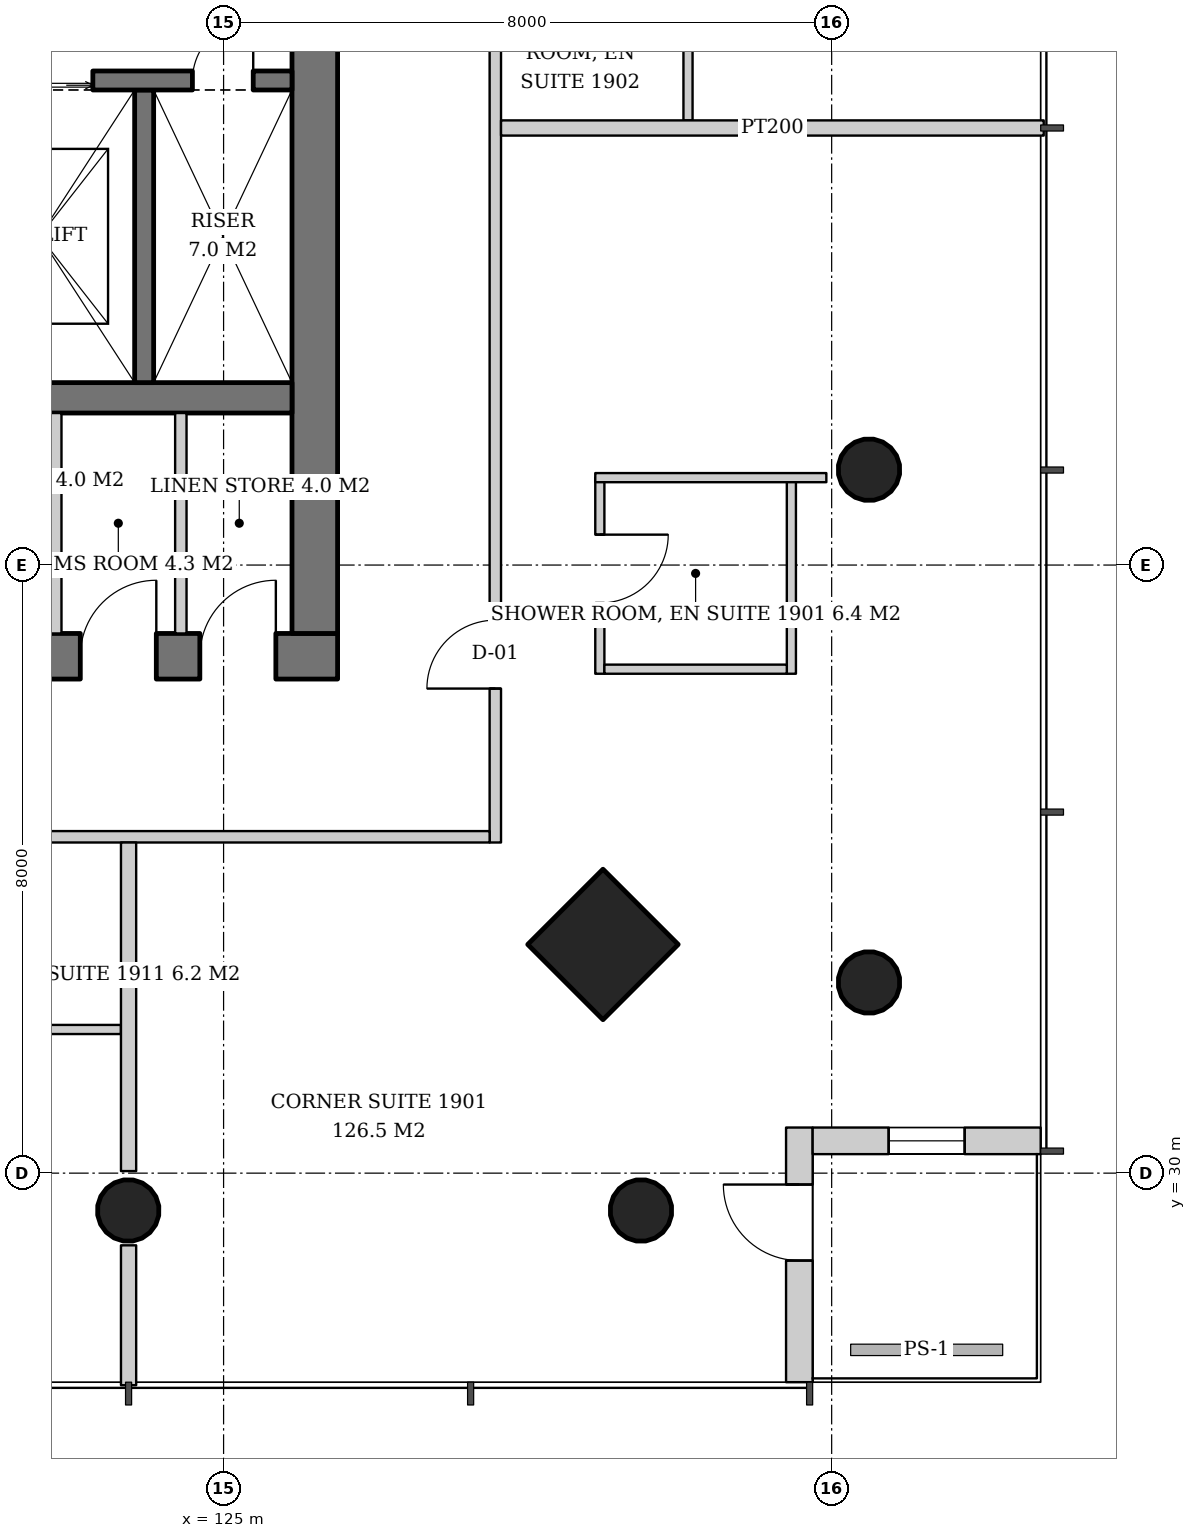
"""IFC4 building model, lengths in metres.
Left out: names, types, materials, properties, quantities, classifications, styles, units other than length and angle.
Written with IfcOpenShell. Run it as: python <this file> out.ifc"""

import sys

from ifc_helpers import new_model, si_unit, direction, frame, frame_2d, origin, origin_2d, place, context, subcontext, project, spatial, rectangle, hollow_circle, extrude, element, fill, save


model = new_model("IFC4")
c1 = context("Model", 3, precision=1e-05, world=origin(), true_north=direction((0.0, 1.0)))
c2 = subcontext(c1, "Body", "Model", "MODEL_VIEW")
j1 = project(units=[si_unit("LENGTHUNIT", "METRE"), si_unit("PLANEANGLEUNIT", "RADIAN")], contexts=[c1])
p1 = place(None, origin())
s1 = spatial("IfcSite", under=j1, at=p1, CompositionType="ELEMENT")
p2 = place(p1, origin())
s2 = spatial("IfcBuilding", under=s1, at=p2, CompositionType="ELEMENT")
p3 = place(p2, frame((0.0, 0.0, 78.0)))
s3 = spatial("IfcBuildingStorey", under=s2, at=p3, CompositionType="ELEMENT", Elevation=78.0)
p4 = place(p3, frame((133.543, 32.457, 0.0), z_axis=(-0.043029647111, 0.043029647111, 0.998146732169), x_axis=(-0.707106781187, -0.707106781187, 0.0)))
e1 = element("IfcColumn", 1, at=p4, inside=s3, PredefinedType="COLUMN", context=c2, shape_type="SweptSolid", body=[
    extrude(hollow_circle(Radius=0.406, WallThickness=0.03, at=origin_2d()), origin(), (0.0, 0.0, 1.0), 3.807),
])
p5 = place(p3, frame((133.543, 39.229, 0.0), z_axis=(-0.043059584825, 0.021497706284, 0.998841188968), x_axis=(-0.446680166538, -0.894693706707, 0.0)))
e2 = element("IfcColumn", 2, at=p5, inside=s3, PredefinedType="COLUMN", context=c2, shape_type="SweptSolid", body=[
    extrude(hollow_circle(Radius=0.406, WallThickness=0.03, at=origin_2d()), origin(), (0.0, 0.0, 1.0), 3.804),
])
p6 = place(p3, frame((130.043, 32.957, 0.0), z_axis=(-0.043029647111, 0.043029647111, 0.998146732169), x_axis=(-0.707106781187, -0.707106781187, 0.0)))
e3 = element("IfcColumn", 3, at=p6, inside=s3, PredefinedType="COLUMN", context=c2, shape_type="SweptSolid", body=[
    extrude(rectangle(XDim=1.4, YDim=1.4, at=origin_2d()), origin(), (0.0, 0.0, 1.0), 3.807),
])
p7 = place(p3, frame((130.543, 29.457, 0.0), z_axis=(-0.043029647111, 0.043029647111, 0.998146732169), x_axis=(-0.707106781187, -0.707106781187, 0.0)))
e4 = element("IfcColumn", 4, at=p7, inside=s3, PredefinedType="COLUMN", context=c2, shape_type="SweptSolid", body=[
    extrude(hollow_circle(Radius=0.406, WallThickness=0.03, at=origin_2d()), origin(), (0.0, 0.0, 1.0), 3.807),
])
p8 = place(p3, frame((123.771, 29.457, 0.0), z_axis=(-0.021497706284, 0.043059584825, 0.998841188968), x_axis=(-0.894693706707, -0.446680166538, 0.0)))
e5 = element("IfcColumn", 5, at=p8, inside=s3, PredefinedType="COLUMN", context=c2, shape_type="SweptSolid", body=[
    extrude(hollow_circle(Radius=0.406, WallThickness=0.03, at=origin_2d()), origin(), (0.0, 0.0, 1.0), 3.804),
])
p9 = place(p3, frame((107.5, 36.8, 0.0), z_axis=(0.0, 0.0, 1.0), x_axis=(1.0, 0.0, 0.0)))
e6 = element("IfcWall", 6, at=p9, inside=s3, PredefinedType="SHEAR", context=c2, shape_type="SweptSolid", body=[
    extrude(rectangle(XDim=19.0, YDim=0.6, at=frame_2d((9.5, 0.0))), origin(), (0.0, 0.0, 1.0), 3.8),
])
p10 = place(p9, frame((3.9, 0.0, 0.0)))
e7 = element("IfcOpeningElement", 7, at=p10, cuts=e6, PredefinedType="OPENING", context=c2, shape_type="SweptSolid", body=[
    extrude(rectangle(XDim=1.0, YDim=2.1, at=frame_2d((0.5, 1.05))), frame((0.0, 0.31, 0.0), z_axis=(0.0, -1.0, 0.0), x_axis=(1.0, 0.0, 0.0)), (0.0, 0.0, 1.0), 0.62),
])
p11 = place(p9, frame((14.08, 0.0, 0.0)))
e8 = element("IfcOpeningElement", 8, at=p11, cuts=e6, PredefinedType="OPENING", context=c2, shape_type="SweptSolid", body=[
    extrude(rectangle(XDim=1.0, YDim=2.1, at=frame_2d((0.5, 1.05))), frame((0.0, 0.31, 0.0), z_axis=(0.0, -1.0, 0.0), x_axis=(1.0, 0.0, 0.0)), (0.0, 0.0, 1.0), 0.62),
])
p12 = place(p9, frame((15.615, 0.0, 0.0)))
e9 = element("IfcOpeningElement", 9, at=p12, cuts=e6, PredefinedType="OPENING", context=c2, shape_type="SweptSolid", body=[
    extrude(rectangle(XDim=1.0, YDim=2.1, at=frame_2d((0.5, 1.05))), frame((0.0, 0.31, 0.0), z_axis=(0.0, -1.0, 0.0), x_axis=(1.0, 0.0, 0.0)), (0.0, 0.0, 1.0), 0.62),
])
p13 = place(p9, frame((17.188, 0.0, 0.0)))
e10 = element("IfcOpeningElement", 10, at=p13, cuts=e6, PredefinedType="OPENING", context=c2, shape_type="SweptSolid", body=[
    extrude(rectangle(XDim=1.0, YDim=2.1, at=frame_2d((0.5, 1.05))), frame((0.0, 0.31, 0.0), z_axis=(0.0, -1.0, 0.0), x_axis=(1.0, 0.0, 0.0)), (0.0, 0.0, 1.0), 0.62),
])
p14 = place(p3, frame((126.2, 37.1, 0.0), z_axis=(0.0, 0.0, 1.0), x_axis=(0.0, 1.0, 0.0)))
e11 = element("IfcWall", 11, at=p14, inside=s3, PredefinedType="SHEAR", context=c2, shape_type="SweptSolid", body=[
    extrude(rectangle(XDim=17.8, YDim=0.6, at=frame_2d((8.9, 0.0))), origin(), (0.0, 0.0, 1.0), 3.8),
])
p15 = place(p14, frame((8.0, 0.0, 0.0)))
e12 = element("IfcOpeningElement", 12, at=p15, cuts=e11, PredefinedType="OPENING", context=c2, shape_type="SweptSolid", body=[
    extrude(rectangle(XDim=1.8, YDim=2.4, at=frame_2d((0.9, 1.2))), frame((0.0, 0.31, 0.0), z_axis=(0.0, -1.0, 0.0), x_axis=(1.0, 0.0, 0.0)), (0.0, 0.0, 1.0), 0.62),
])
p16 = place(p3, frame((108.1, 40.2, 0.0), z_axis=(0.0, 0.0, 1.0), x_axis=(1.0, 0.0, 0.0)))
e13 = element("IfcWall", 13, at=p16, inside=s3, PredefinedType="SHEAR", context=c2, shape_type="SweptSolid", body=[
    extrude(rectangle(XDim=17.8, YDim=0.4, at=frame_2d((8.9, 0.0))), origin(), (0.0, 0.0, 1.0), 3.8),
])
p17 = place(p3, frame((132.575, 27.25, 0.0), z_axis=(0.0, 0.0, 1.0), x_axis=(0.0, 1.0, 0.0)))
e14 = element("IfcWall", 14, at=p17, inside=s3, PredefinedType="SOLIDWALL", context=c2, shape_type="SweptSolid", body=[
    extrude(rectangle(XDim=3.35, YDim=0.35, at=frame_2d((1.675, 0.0))), origin(), (0.0, 0.0, 1.0), 3.52),
])
p18 = place(p17, frame((1.6, 0.0, 0.0)))
e15 = element("IfcOpeningElement", 15, at=p18, cuts=e14, PredefinedType="OPENING", context=c2, shape_type="SweptSolid", body=[
    extrude(rectangle(XDim=1.0, YDim=2.4, at=frame_2d((0.5, 1.2))), frame((0.0, 0.185, 0.0), z_axis=(0.0, -1.0, 0.0), x_axis=(1.0, 0.0, 0.0)), (0.0, 0.0, 1.0), 0.37),
])
p19 = place(p3, frame((132.75, 30.425, 0.0), z_axis=(0.0, 0.0, 1.0), x_axis=(1.0, 0.0, 0.0)))
e16 = element("IfcWall", 16, at=p19, inside=s3, PredefinedType="SOLIDWALL", context=c2, shape_type="SweptSolid", body=[
    extrude(rectangle(XDim=3.0, YDim=0.35, at=frame_2d((1.5, 0.0))), origin(), (0.0, 0.0, 1.0), 3.52),
])
p20 = place(p19, frame((1.0, 0.0, 0.82)))
e17 = element("IfcOpeningElement", 17, at=p20, cuts=e16, PredefinedType="OPENING", context=c2, shape_type="SweptSolid", body=[
    extrude(rectangle(XDim=1.0, YDim=2.4, at=frame_2d((0.5, 1.2))), frame((0.0, 0.185, 0.0), z_axis=(0.0, -1.0, 0.0), x_axis=(1.0, 0.0, 0.0)), (0.0, 0.0, 1.0), 0.37),
])
p21 = place(p3, frame((123.955, 44.25, 0.0), z_axis=(0.0, 0.0, 1.0), x_axis=(0.0, -1.0, 0.0)))
e18 = element("IfcWall", 18, at=p21, inside=s3, PredefinedType="SHEAR", context=c2, shape_type="SweptSolid", body=[
    extrude(rectangle(XDim=3.85, YDim=0.25, at=frame_2d((1.925, 0.0))), origin(), (0.0, 0.0, 1.0), 3.8),
])
p22 = place(p3, frame((121.33, 44.375, 0.0), z_axis=(0.0, 0.0, 1.0), x_axis=(1.0, 0.0, 0.0)))
e19 = element("IfcWall", 19, at=p22, inside=s3, PredefinedType="SHEAR", context=c2, shape_type="SweptSolid", body=[
    extrude(rectangle(XDim=4.57, YDim=0.25, at=frame_2d((2.285, 0.0))), origin(), (0.0, 0.0, 1.0), 3.8),
])
p23 = place(p22, frame((0.55, 0.0, 0.0)))
e20 = element("IfcOpeningElement", 20, at=p23, cuts=e19, PredefinedType="OPENING", context=c2, shape_type="SweptSolid", body=[
    extrude(rectangle(XDim=1.4, YDim=2.4, at=frame_2d((0.7, 1.2))), frame((0.0, 0.135, 0.0), z_axis=(0.0, -1.0, 0.0), x_axis=(1.0, 0.0, 0.0)), (0.0, 0.0, 1.0), 0.27),
])
p24 = place(p22, frame((3.26, 0.0, 0.0)))
e21 = element("IfcOpeningElement", 21, at=p24, cuts=e19, PredefinedType="OPENING", context=c2, shape_type="SweptSolid", body=[
    extrude(rectangle(XDim=0.8, YDim=2.0, at=frame_2d((0.4, 1.0))), frame((0.0, 0.135, 0.0), z_axis=(0.0, -1.0, 0.0), x_axis=(1.0, 0.0, 0.0)), (0.0, 0.0, 1.0), 0.27),
])
for number, where, z_axis, x_axis in (
    (22, (122.792, 37.1, 0.0), (0.0, 0.0, 1.0), (0.0, 1.0, 0.0)),
    (23, (124.438, 37.1, 0.0), (0.0, 0.0, 1.0), (0.0, 1.0, 0.0)),
):
    element("IfcWall", number, at=place(p3, frame(where, z_axis=z_axis, x_axis=x_axis)), inside=s3, PredefinedType="SOLIDWALL", context=c2, shape_type="SweptSolid", body=[
        extrude(rectangle(XDim=2.9, YDim=0.15, at=frame_2d((1.45, 0.0))), origin(), (0.0, 0.0, 1.0), 3.52),
    ])
p25 = place(p3, frame((129.95, 39.15, 0.0), z_axis=(0.0, 0.0, 1.0), x_axis=(0.0, -1.0, 0.0)))
e24 = element("IfcWall", 24, at=p25, inside=s3, PredefinedType="PARTITIONING", context=c2, shape_type="SweptSolid", body=[
    extrude(rectangle(XDim=2.58, YDim=0.12, at=frame_2d((1.29, 0.0))), origin(), (0.0, 0.0, 1.0), 2.82),
])
p26 = place(p25, frame((0.75, 0.0, 0.0)))
e25 = element("IfcOpeningElement", 25, at=p26, cuts=e24, PredefinedType="OPENING", context=c2, shape_type="SweptSolid", body=[
    extrude(rectangle(XDim=0.9, YDim=2.1, at=frame_2d((0.45, 1.05))), frame((0.0, 0.07, 0.0), z_axis=(0.0, -1.0, 0.0), x_axis=(1.0, 0.0, 0.0)), (0.0, 0.0, 1.0), 0.14),
])
p27 = place(p3, frame((132.47, 39.15, 0.0), z_axis=(0.0, 0.0, 1.0), x_axis=(0.0, -1.0, 0.0)))
e26 = element("IfcWall", 26, at=p27, inside=s3, PredefinedType="PARTITIONING", context=c2, shape_type="SweptSolid", body=[
    extrude(rectangle(XDim=2.58, YDim=0.12, at=frame_2d((1.29, 0.0))), origin(), (0.0, 0.0, 1.0), 2.82),
])
p28 = place(p3, frame((130.01, 36.63, 0.0), z_axis=(0.0, 0.0, 1.0), x_axis=(1.0, 0.0, 0.0)))
e27 = element("IfcWall", 27, at=p28, inside=s3, PredefinedType="PARTITIONING", context=c2, shape_type="SweptSolid", body=[
    extrude(rectangle(XDim=2.4, YDim=0.12, at=frame_2d((1.2, 0.0))), origin(), (0.0, 0.0, 1.0), 2.82),
])
p29 = place(p3, frame((129.89, 39.15, 0.0), z_axis=(0.0, 0.0, 1.0), x_axis=(1.0, 0.0, 0.0)))
e28 = element("IfcWall", 28, at=p29, inside=s3, PredefinedType="PARTITIONING", context=c2, shape_type="SweptSolid", body=[
    extrude(rectangle(XDim=3.04, YDim=0.12, at=frame_2d((1.52, 0.0))), origin(), (0.0, 0.0, 1.0), 3.52),
])
p30 = place(p3, frame((131.11, 43.85, 0.0), z_axis=(0.0, 0.0, 1.0), x_axis=(0.0, 1.0, 0.0)))
e29 = element("IfcWall", 29, at=p30, inside=s3, PredefinedType="PARTITIONING", context=c2, shape_type="SweptSolid", body=[
    extrude(rectangle(XDim=2.42, YDim=0.12, at=frame_2d((1.21, 0.0))), origin(), (0.0, 0.0, 1.0), 2.72),
])
p31 = place(p3, frame((128.575, 34.35, 0.0), z_axis=(0.0, 0.0, 1.0), x_axis=(0.0, 1.0, 0.0)))
e30 = element("IfcWall", 30, at=p31, inside=s3, PredefinedType="PARTITIONING", context=c2, shape_type="SweptSolid", body=[
    extrude(rectangle(XDim=23.15, YDim=0.15, at=frame_2d((11.575, 0.0))), origin(), (0.0, 0.0, 1.0), 2.72),
])
p32 = place(p31, frame((2.025, 0.0, 0.0)))
e31 = element("IfcOpeningElement", 31, at=p32, cuts=e30, PredefinedType="OPENING", context=c2, shape_type="SweptSolid", body=[
    extrude(rectangle(XDim=0.9, YDim=2.1, at=frame_2d((0.45, 1.05))), frame((0.0, 0.085, 0.0), z_axis=(0.0, -1.0, 0.0), x_axis=(1.0, 0.0, 0.0)), (0.0, 0.0, 1.0), 0.17),
])
p33 = place(p31, frame((12.15, 0.0, 0.0)))
e32 = element("IfcOpeningElement", 32, at=p33, cuts=e30, PredefinedType="OPENING", context=c2, shape_type="SweptSolid", body=[
    extrude(rectangle(XDim=0.9, YDim=2.1, at=frame_2d((0.45, 1.05))), frame((0.0, 0.085, 0.0), z_axis=(0.0, -1.0, 0.0), x_axis=(1.0, 0.0, 0.0)), (0.0, 0.0, 1.0), 0.17),
])
p34 = place(p3, frame((128.65, 43.75, 0.0), z_axis=(0.0, 0.0, 1.0), x_axis=(1.0, 0.0, 0.0)))
e33 = element("IfcWall", 33, at=p34, inside=s3, PredefinedType="PARTITIONING", context=c2, shape_type="SweptSolid", body=[
    extrude(rectangle(XDim=7.14, YDim=0.2, at=frame_2d((3.57, 0.0))), origin(), (0.0, 0.0, 1.0), 3.12),
])
p35 = place(p3, frame((121.23, 31.89, 0.0), z_axis=(0.0, 0.0, 1.0), x_axis=(1.0, 0.0, 0.0)))
e34 = element("IfcWall", 34, at=p35, inside=s3, PredefinedType="PARTITIONING", context=c2, shape_type="SweptSolid", body=[
    extrude(rectangle(XDim=2.42, YDim=0.12, at=frame_2d((1.21, 0.0))), origin(), (0.0, 0.0, 1.0), 3.52),
])
p36 = place(p3, frame((105.35, 34.425, 0.0), z_axis=(0.0, 0.0, 1.0), x_axis=(1.0, 0.0, 0.0)))
e35 = element("IfcWall", 35, at=p36, inside=s3, PredefinedType="PARTITIONING", context=c2, shape_type="SweptSolid", body=[
    extrude(rectangle(XDim=23.15, YDim=0.15, at=frame_2d((11.575, 0.0))), origin(), (0.0, 0.0, 1.0), 2.72),
])
p37 = place(p36, frame((2.025, 0.0, 0.0)))
e36 = element("IfcOpeningElement", 36, at=p37, cuts=e35, PredefinedType="OPENING", context=c2, shape_type="SweptSolid", body=[
    extrude(rectangle(XDim=0.9, YDim=2.1, at=frame_2d((0.45, 1.05))), frame((0.0, 0.085, 0.0), z_axis=(0.0, -1.0, 0.0), x_axis=(1.0, 0.0, 0.0)), (0.0, 0.0, 1.0), 0.17),
])
p38 = place(p36, frame((7.65, 0.0, 0.0)))
e37 = element("IfcOpeningElement", 37, at=p38, cuts=e35, PredefinedType="OPENING", context=c2, shape_type="SweptSolid", body=[
    extrude(rectangle(XDim=0.9, YDim=2.1, at=frame_2d((0.45, 1.05))), frame((0.0, 0.085, 0.0), z_axis=(0.0, -1.0, 0.0), x_axis=(1.0, 0.0, 0.0)), (0.0, 0.0, 1.0), 0.17),
])
p39 = place(p36, frame((14.75, 0.0, 0.0)))
e38 = element("IfcOpeningElement", 38, at=p39, cuts=e35, PredefinedType="OPENING", context=c2, shape_type="SweptSolid", body=[
    extrude(rectangle(XDim=0.9, YDim=2.1, at=frame_2d((0.45, 1.05))), frame((0.0, 0.085, 0.0), z_axis=(0.0, -1.0, 0.0), x_axis=(1.0, 0.0, 0.0)), (0.0, 0.0, 1.0), 0.17),
])
p40 = place(p3, frame((123.75, 34.35, 0.0), z_axis=(0.0, 0.0, 1.0), x_axis=(0.0, -1.0, 0.0)))
e39 = element("IfcWall", 39, at=p40, inside=s3, PredefinedType="PARTITIONING", context=c2, shape_type="SweptSolid", body=[
    extrude(rectangle(XDim=4.323, YDim=0.2, at=frame_2d((2.162, 0.0))), origin(), (0.0, 0.0, 1.0), 3.52),
])
p41 = place(p3, frame((123.75, 29.05, 0.0), z_axis=(0.0, 0.0, 1.0), x_axis=(0.0, -1.0, 0.0)))
e40 = element("IfcWall", 40, at=p41, inside=s3, PredefinedType="PARTITIONING", context=c2, shape_type="SweptSolid", body=[
    extrude(rectangle(XDim=1.84, YDim=0.2, at=frame_2d((0.92, 0.0))), origin(), (0.0, 0.0, 1.0), 3.52),
])
p42 = place(p18, origin())
e41 = element("IfcDoor", 41, at=p42, inside=s3, OperationType="SINGLE_SWING_RIGHT", PredefinedType="DOOR", context=c2, shape_type="SweptSolid", body=[
    extrude(rectangle(XDim=1.0, YDim=2.4, at=frame_2d((0.5, 1.2))), frame((0.0, 0.025, 0.0), z_axis=(0.0, -1.0, 0.0), x_axis=(1.0, 0.0, 0.0)), (0.0, 0.0, 1.0), 0.05),
])
fill(e15, e41)
p43 = place(p20, origin())
e42 = element("IfcWindow", 42, at=p43, inside=s3, PartitioningType="SINGLE_PANEL", PredefinedType="WINDOW", context=c2, shape_type="SweptSolid", body=[
    extrude(rectangle(XDim=1.0, YDim=2.4, at=frame_2d((0.5, 1.2))), frame((0.0, 0.03, 0.0), z_axis=(0.0, -1.0, 0.0), x_axis=(1.0, 0.0, 0.0)), (0.0, 0.0, 1.0), 0.06),
])
fill(e17, e42)
p44 = place(p23, origin())
e43 = element("IfcDoor", 43, at=p44, inside=s3, OperationType="DOUBLE_DOOR_SLIDING", PredefinedType="DOOR", context=c2, shape_type="SweptSolid", body=[
    extrude(rectangle(XDim=1.4, YDim=2.4, at=frame_2d((0.7, 1.2))), frame((0.0, 0.025, 0.0), z_axis=(0.0, -1.0, 0.0), x_axis=(1.0, 0.0, 0.0)), (0.0, 0.0, 1.0), 0.05),
])
fill(e20, e43)
p45 = place(p24, origin())
e44 = element("IfcDoor", 44, at=p45, inside=s3, OperationType="SINGLE_SWING_RIGHT", PredefinedType="DOOR", context=c2, shape_type="SweptSolid", body=[
    extrude(rectangle(XDim=0.8, YDim=2.0, at=frame_2d((0.4, 1.0))), frame((0.0, 0.025, 0.0), z_axis=(0.0, -1.0, 0.0), x_axis=(1.0, 0.0, 0.0)), (0.0, 0.0, 1.0), 0.05),
])
fill(e21, e44)
p46 = place(p12, origin())
e45 = element("IfcDoor", 45, at=p46, inside=s3, OperationType="SINGLE_SWING_RIGHT", PredefinedType="DOOR", context=c2, shape_type="SweptSolid", body=[
    extrude(rectangle(XDim=1.0, YDim=2.1, at=frame_2d((0.5, 1.05))), frame((0.0, 0.29, 0.0), z_axis=(0.0, -1.0, 0.0), x_axis=(1.0, 0.0, 0.0)), (0.0, 0.0, 1.0), 0.05),
])
fill(e9, e45)
p47 = place(p13, origin())
e46 = element("IfcDoor", 46, at=p47, inside=s3, OperationType="SINGLE_SWING_RIGHT", PredefinedType="DOOR", context=c2, shape_type="SweptSolid", body=[
    extrude(rectangle(XDim=1.0, YDim=2.1, at=frame_2d((0.5, 1.05))), frame((0.0, 0.29, 0.0), z_axis=(0.0, -1.0, 0.0), x_axis=(1.0, 0.0, 0.0)), (0.0, 0.0, 1.0), 0.05),
])
fill(e10, e46)
p48 = place(p26, origin())
e47 = element("IfcDoor", 47, at=p48, inside=s3, OperationType="SINGLE_SWING_LEFT", PredefinedType="DOOR", context=c2, shape_type="SweptSolid", body=[
    extrude(rectangle(XDim=0.9, YDim=2.1, at=frame_2d((0.45, 1.05))), frame((0.0, 0.025, 0.0), z_axis=(0.0, -1.0, 0.0), x_axis=(1.0, 0.0, 0.0)), (0.0, 0.0, 1.0), 0.05),
])
fill(e25, e47)
p49 = place(p32, origin())
e48 = element("IfcDoor", 48, at=p49, inside=s3, OperationType="SINGLE_SWING_LEFT", PredefinedType="DOOR", context=c2, shape_type="SweptSolid", body=[
    extrude(rectangle(XDim=0.9, YDim=2.1, at=frame_2d((0.45, 1.05))), frame((0.0, 0.025, 0.0), z_axis=(0.0, -1.0, 0.0), x_axis=(1.0, 0.0, 0.0)), (0.0, 0.0, 1.0), 0.05),
])
fill(e31, e48)
save(model, sys.argv[1])
